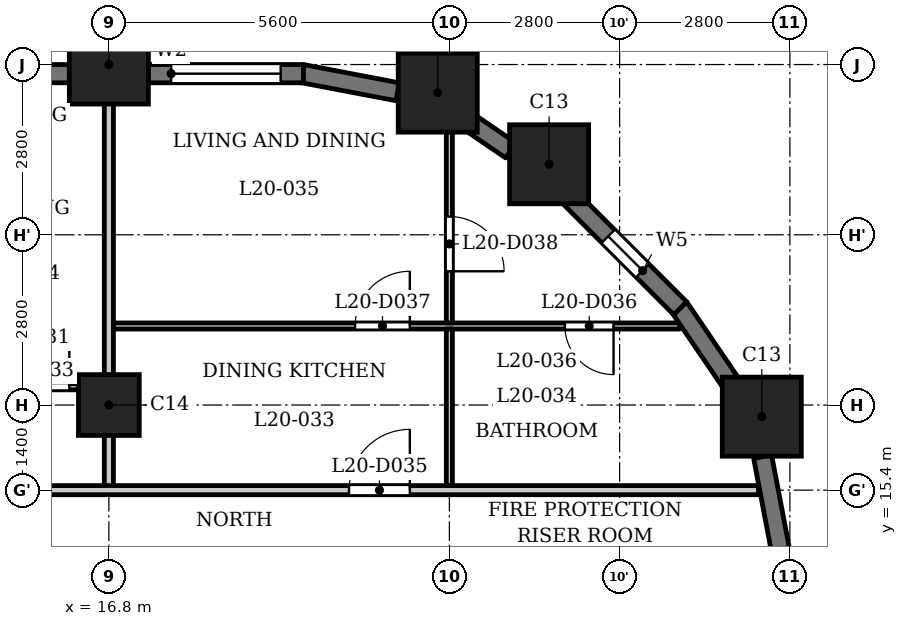
"""IFC4 building model, lengths in metres.
Left out: names, types, materials, properties, quantities, classifications, styles, units other than length and angle.
Written with IfcOpenShell. Run it as: python <this file> out.ifc"""

import sys

from ifc_helpers import new_model, si_unit, direction, frame, frame_2d, origin, origin_2d, place, context, subcontext, project, spatial, rectangle, extrude, element, fill, save


model = new_model("IFC4")
c1 = context("Model", 3, precision=1e-05, world=origin(), true_north=direction((0.0, 1.0)))
c2 = subcontext(c1, "Body", "Model", "MODEL_VIEW")
j1 = project(units=[si_unit("LENGTHUNIT", "METRE"), si_unit("PLANEANGLEUNIT", "RADIAN")], contexts=[c1])
p1 = place(None, origin())
s1 = spatial("IfcSite", under=j1, at=p1, CompositionType="ELEMENT")
p2 = place(p1, origin())
s2 = spatial("IfcBuilding", under=s1, at=p2, CompositionType="ELEMENT")
p3 = place(p2, frame((0.0, 0.0, 83.3)))
s3 = spatial("IfcBuildingStorey", under=s2, at=p3, CompositionType="ELEMENT", Elevation=83.3)
for number, where, z_axis, x_axis in (
    (1, (27.538, 16.609, 0.0), (0.0, 0.0, 1.0), (1.0, 0.0, 0.0)),
    (2, (24.04, 20.76, 0.0), (0.0, 0.0, 1.0), (1.0, 0.0, 0.0)),
    (3, (22.209, 21.938, 0.0), (0.0, 0.0, 1.0), (1.0, 0.0, 0.0)),
    (4, (16.8, 22.4, 0.0), (0.0, 0.0, 1.0), (1.0, 0.0, 0.0)),
):
    element("IfcColumn", number, at=place(p3, frame(where, z_axis=z_axis, x_axis=x_axis)), inside=s3, PredefinedType="COLUMN", context=c2, shape_type="SweptSolid", body=[
        extrude(rectangle(XDim=1.3, YDim=1.3, at=origin_2d()), origin(), (0.0, 0.0, 1.0), 3.5),
    ])
p4 = place(p3, frame((16.8, 16.8, 0.0), z_axis=(0.0, 0.0, 1.0), x_axis=(1.0, 0.0, 0.0)))
e5 = element("IfcColumn", 5, at=p4, inside=s3, PredefinedType="COLUMN", context=c2, shape_type="SweptSolid", body=[
    extrude(rectangle(XDim=1.0, YDim=1.0, at=origin_2d()), origin(), (0.0, 0.0, 1.0), 3.5),
])
for number, where, z_axis, x_axis in (
    (6, (27.853, 14.372, 0.0), (0.0, 0.0, 1.0), (-0.187, 0.982, 0.0)),
    (7, (27.082, 17.084, 0.0), (0.0, 0.0, 1.0), (-0.562, 0.827, 0.0)),
):
    element("IfcWall", number, at=place(p3, frame(where, z_axis=z_axis, x_axis=x_axis)), inside=s3, PredefinedType="SOLIDWALL", context=c2, shape_type="SweptSolid", body=[
        extrude(rectangle(XDim=1.606, YDim=0.3, at=frame_2d((0.803, 0.0))), origin(), (0.0, 0.0, 1.0), 2.4),
    ])
p5 = place(p3, frame((26.197, 18.391, 0.0), z_axis=(0.0, 0.0, 1.0), x_axis=(-0.707058908279, 0.707154650853, 0.0)))
e8 = element("IfcWall", 8, at=p5, inside=s3, PredefinedType="SOLIDWALL", context=c2, shape_type="SweptSolid", body=[
    extrude(rectangle(XDim=2.55, YDim=0.3, at=frame_2d((1.275, 0.0))), origin(), (0.0, 0.0, 1.0), 2.4),
])
p6 = place(p5, frame((0.875, 0.0, 0.6)))
e9 = element("IfcOpeningElement", 9, at=p6, cuts=e8, PredefinedType="OPENING", context=c2, shape_type="SweptSolid", body=[
    extrude(rectangle(XDim=0.8, YDim=1.55, at=frame_2d((0.4, 0.775))), frame((0.0, 0.16, 0.0), z_axis=(0.0, -1.0, 0.0), x_axis=(1.0, 0.0, 0.0)), (0.0, 0.0, 1.0), 0.32),
])
p7 = place(p3, frame((23.41, 20.989, 0.0), z_axis=(0.0, 0.0, 1.0), x_axis=(-0.827050703543, 0.562127328787, 0.0)))
e10 = element("IfcWall", 10, at=p7, inside=s3, PredefinedType="SOLIDWALL", context=c2, shape_type="SweptSolid", body=[
    extrude(rectangle(XDim=0.877, YDim=0.3, at=frame_2d((0.438, 0.0))), origin(), (0.0, 0.0, 1.0), 3.2),
])
p8 = place(p3, frame((21.55, 21.952, 0.0), z_axis=(0.0, 0.0, 1.0), x_axis=(-0.982278644094, 0.187426426519, 0.0)))
e11 = element("IfcWall", 11, at=p8, inside=s3, PredefinedType="SOLIDWALL", context=c2, shape_type="SweptSolid", body=[
    extrude(rectangle(XDim=1.606, YDim=0.3, at=frame_2d((0.803, 0.0))), origin(), (0.0, 0.0, 1.0), 2.4),
])
p9 = place(p3, frame((20.0, 22.25, 0.0), z_axis=(0.0, 0.0, 1.0), x_axis=(-1.0, 0.0, 0.0)))
e12 = element("IfcWall", 12, at=p9, inside=s3, PredefinedType="SOLIDWALL", context=c2, shape_type="SweptSolid", body=[
    extrude(rectangle(XDim=2.55, YDim=0.3, at=frame_2d((1.275, 0.0))), origin(), (0.0, 0.0, 1.0), 2.4),
])
p10 = place(p9, frame((0.375, 0.0, 0.9)))
e13 = element("IfcOpeningElement", 13, at=p10, cuts=e12, PredefinedType="OPENING", context=c2, shape_type="SweptSolid", body=[
    extrude(rectangle(XDim=1.8, YDim=1.25, at=frame_2d((0.9, 0.625))), frame((0.0, 0.16, 0.0), z_axis=(0.0, -1.0, 0.0), x_axis=(1.0, 0.0, 0.0)), (0.0, 0.0, 1.0), 0.32),
])
p11 = place(p3, frame((16.15, 22.25, 0.0), z_axis=(0.0, 0.0, 1.0), x_axis=(-1.0, 0.0, 0.0)))
e14 = element("IfcWall", 14, at=p11, inside=s3, PredefinedType="SOLIDWALL", context=c2, shape_type="SweptSolid", body=[
    extrude(rectangle(XDim=4.3, YDim=0.3, at=frame_2d((2.15, 0.0))), origin(), (0.0, 0.0, 1.0), 2.4),
])
p12 = place(p11, frame((0.337, 0.0, 0.6)))
e15 = element("IfcOpeningElement", 15, at=p12, cuts=e14, PredefinedType="OPENING", context=c2, shape_type="SweptSolid", body=[
    extrude(rectangle(XDim=1.2, YDim=1.55, at=frame_2d((0.6, 0.775))), frame((0.0, 0.16, 0.0), z_axis=(0.0, -1.0, 0.0), x_axis=(1.0, 0.0, 0.0)), (0.0, 0.0, 1.0), 0.32),
])
p13 = place(p11, frame((2.562, 0.0, 0.6)))
e16 = element("IfcOpeningElement", 16, at=p13, cuts=e14, PredefinedType="OPENING", context=c2, shape_type="SweptSolid", body=[
    extrude(rectangle(XDim=1.2, YDim=1.55, at=frame_2d((0.6, 0.775))), frame((0.0, 0.16, 0.0), z_axis=(0.0, -1.0, 0.0), x_axis=(1.0, 0.0, 0.0)), (0.0, 0.0, 1.0), 0.32),
])
p14 = place(p3, frame((14.925, 15.4, 0.0), z_axis=(0.0, 0.0, 1.0), x_axis=(1.0, 0.0, 0.0)))
e17 = element("IfcWall", 17, at=p14, inside=s3, PredefinedType="PARTITIONING", context=c2, shape_type="SweptSolid", body=[
    extrude(rectangle(XDim=12.559, YDim=0.15, at=frame_2d((6.279, 0.0))), origin(), (0.0, 0.0, 1.0), 3.2),
])
p15 = place(p14, frame((5.825, 0.0, 0.0)))
e18 = element("IfcOpeningElement", 18, at=p15, cuts=e17, PredefinedType="OPENING", context=c2, shape_type="SweptSolid", body=[
    extrude(rectangle(XDim=1.0, YDim=2.1, at=frame_2d((0.5, 1.05))), frame((0.0, 0.085, 0.0), z_axis=(0.0, -1.0, 0.0), x_axis=(1.0, 0.0, 0.0)), (0.0, 0.0, 1.0), 0.17),
])
p16 = place(p3, frame((-16.725, 17.1, 0.0), z_axis=(0.0, 0.0, 1.0), x_axis=(1.0, 0.0, 0.0)))
e19 = element("IfcWall", 19, at=p16, inside=s3, PredefinedType="PARTITIONING", context=c2, shape_type="SweptSolid", body=[
    extrude(rectangle(XDim=33.45, YDim=0.1, at=frame_2d((16.725, 0.0))), origin(), (0.0, 0.0, 1.0), 3.2),
])
p17 = place(p16, frame((3.925, 0.0, 0.0)))
e20 = element("IfcOpeningElement", 20, at=p17, cuts=e19, PredefinedType="OPENING", context=c2, shape_type="SweptSolid", body=[
    extrude(rectangle(XDim=0.8, YDim=2.1, at=frame_2d((0.4, 1.05))), frame((0.0, 0.06, 0.0), z_axis=(0.0, -1.0, 0.0), x_axis=(1.0, 0.0, 0.0)), (0.0, 0.0, 1.0), 0.12),
])
p18 = place(p16, frame((0.975, 0.0, 0.0)))
e21 = element("IfcOpeningElement", 21, at=p18, cuts=e19, PredefinedType="OPENING", context=c2, shape_type="SweptSolid", body=[
    extrude(rectangle(XDim=0.9, YDim=2.1, at=frame_2d((0.45, 1.05))), frame((0.0, 0.06, 0.0), z_axis=(0.0, -1.0, 0.0), x_axis=(1.0, 0.0, 0.0)), (0.0, 0.0, 1.0), 0.12),
])
p19 = place(p16, frame((6.425, 0.0, 0.0)))
e22 = element("IfcOpeningElement", 22, at=p19, cuts=e19, PredefinedType="OPENING", context=c2, shape_type="SweptSolid", body=[
    extrude(rectangle(XDim=0.8, YDim=2.1, at=frame_2d((0.4, 1.05))), frame((0.0, 0.06, 0.0), z_axis=(0.0, -1.0, 0.0), x_axis=(1.0, 0.0, 0.0)), (0.0, 0.0, 1.0), 0.12),
])
p20 = place(p16, frame((8.825, 0.0, 0.0)))
e23 = element("IfcOpeningElement", 23, at=p20, cuts=e19, PredefinedType="OPENING", context=c2, shape_type="SweptSolid", body=[
    extrude(rectangle(XDim=0.9, YDim=2.1, at=frame_2d((0.45, 1.05))), frame((0.0, 0.06, 0.0), z_axis=(0.0, -1.0, 0.0), x_axis=(1.0, 0.0, 0.0)), (0.0, 0.0, 1.0), 0.12),
])
p21 = place(p16, frame((12.375, 0.0, 0.0)))
e24 = element("IfcOpeningElement", 24, at=p21, cuts=e19, PredefinedType="OPENING", context=c2, shape_type="SweptSolid", body=[
    extrude(rectangle(XDim=0.9, YDim=2.1, at=frame_2d((0.45, 1.05))), frame((0.0, 0.06, 0.0), z_axis=(0.0, -1.0, 0.0), x_axis=(1.0, 0.0, 0.0)), (0.0, 0.0, 1.0), 0.12),
])
p22 = place(p16, frame((14.425, 0.0, 0.0)))
e25 = element("IfcOpeningElement", 25, at=p22, cuts=e19, PredefinedType="OPENING", context=c2, shape_type="SweptSolid", body=[
    extrude(rectangle(XDim=0.9, YDim=2.1, at=frame_2d((0.45, 1.05))), frame((0.0, 0.06, 0.0), z_axis=(0.0, -1.0, 0.0), x_axis=(1.0, 0.0, 0.0)), (0.0, 0.0, 1.0), 0.12),
])
p23 = place(p16, frame((26.225, 0.0, 0.0)))
e26 = element("IfcOpeningElement", 26, at=p23, cuts=e19, PredefinedType="OPENING", context=c2, shape_type="SweptSolid", body=[
    extrude(rectangle(XDim=0.8, YDim=2.1, at=frame_2d((0.4, 1.05))), frame((0.0, 0.06, 0.0), z_axis=(0.0, -1.0, 0.0), x_axis=(1.0, 0.0, 0.0)), (0.0, 0.0, 1.0), 0.12),
])
p24 = place(p16, frame((23.025, 0.0, 0.0)))
e27 = element("IfcOpeningElement", 27, at=p24, cuts=e19, PredefinedType="OPENING", context=c2, shape_type="SweptSolid", body=[
    extrude(rectangle(XDim=0.9, YDim=2.1, at=frame_2d((0.45, 1.05))), frame((0.0, 0.06, 0.0), z_axis=(0.0, -1.0, 0.0), x_axis=(1.0, 0.0, 0.0)), (0.0, 0.0, 1.0), 0.12),
])
p25 = place(p16, frame((17.775, 0.0, 0.0)))
e28 = element("IfcOpeningElement", 28, at=p25, cuts=e19, PredefinedType="OPENING", context=c2, shape_type="SweptSolid", body=[
    extrude(rectangle(XDim=0.9, YDim=2.1, at=frame_2d((0.45, 1.05))), frame((0.0, 0.06, 0.0), z_axis=(0.0, -1.0, 0.0), x_axis=(1.0, 0.0, 0.0)), (0.0, 0.0, 1.0), 0.12),
])
p26 = place(p16, frame((20.025, 0.0, 0.0)))
e29 = element("IfcOpeningElement", 29, at=p26, cuts=e19, PredefinedType="OPENING", context=c2, shape_type="SweptSolid", body=[
    extrude(rectangle(XDim=0.9, YDim=2.1, at=frame_2d((0.45, 1.05))), frame((0.0, 0.06, 0.0), z_axis=(0.0, -1.0, 0.0), x_axis=(1.0, 0.0, 0.0)), (0.0, 0.0, 1.0), 0.12),
])
p27 = place(p16, frame((28.825, 0.0, 0.0)))
e30 = element("IfcOpeningElement", 30, at=p27, cuts=e19, PredefinedType="OPENING", context=c2, shape_type="SweptSolid", body=[
    extrude(rectangle(XDim=0.8, YDim=2.1, at=frame_2d((0.4, 1.05))), frame((0.0, 0.06, 0.0), z_axis=(0.0, -1.0, 0.0), x_axis=(1.0, 0.0, 0.0)), (0.0, 0.0, 1.0), 0.12),
])
p28 = place(p16, frame((31.975, 0.0, 0.0)))
e31 = element("IfcOpeningElement", 31, at=p28, cuts=e19, PredefinedType="OPENING", context=c2, shape_type="SweptSolid", body=[
    extrude(rectangle(XDim=0.9, YDim=2.1, at=frame_2d((0.45, 1.05))), frame((0.0, 0.06, 0.0), z_axis=(0.0, -1.0, 0.0), x_axis=(1.0, 0.0, 0.0)), (0.0, 0.0, 1.0), 0.12),
])
p29 = place(p3, frame((16.875, 18.1, 0.0), z_axis=(0.0, 0.0, 1.0), x_axis=(1.0, 0.0, 0.0)))
e32 = element("IfcWall", 32, at=p29, inside=s3, PredefinedType="PARTITIONING", context=c2, shape_type="SweptSolid", body=[
    extrude(rectangle(XDim=9.315, YDim=0.1, at=frame_2d((4.658, 0.0))), origin(), (0.0, 0.0, 1.0), 3.2),
])
p30 = place(p29, frame((7.425, 0.0, 0.0)))
e33 = element("IfcOpeningElement", 33, at=p30, cuts=e32, PredefinedType="OPENING", context=c2, shape_type="SweptSolid", body=[
    extrude(rectangle(XDim=0.8, YDim=2.1, at=frame_2d((0.4, 1.05))), frame((0.0, 0.06, 0.0), z_axis=(0.0, -1.0, 0.0), x_axis=(1.0, 0.0, 0.0)), (0.0, 0.0, 1.0), 0.12),
])
p31 = place(p29, frame((3.975, 0.0, 0.0)))
e34 = element("IfcOpeningElement", 34, at=p31, cuts=e32, PredefinedType="OPENING", context=c2, shape_type="SweptSolid", body=[
    extrude(rectangle(XDim=0.9, YDim=2.1, at=frame_2d((0.45, 1.05))), frame((0.0, 0.06, 0.0), z_axis=(0.0, -1.0, 0.0), x_axis=(1.0, 0.0, 0.0)), (0.0, 0.0, 1.0), 0.12),
])
p32 = place(p3, frame((16.8, 15.475, 0.0), z_axis=(0.0, 0.0, 1.0), x_axis=(0.0, 1.0, 0.0)))
e35 = element("IfcWall", 35, at=p32, inside=s3, PredefinedType="PARTITIONING", context=c2, shape_type="SweptSolid", body=[
    extrude(rectangle(XDim=7.555, YDim=0.15, at=frame_2d((3.777, 0.0))), origin(), (0.0, 0.0, 1.0), 3.2),
])
p33 = place(p3, frame((22.4, 15.475, 0.0), z_axis=(0.0, 0.0, 1.0), x_axis=(0.0, 1.0, 0.0)))
e36 = element("IfcWall", 36, at=p33, inside=s3, PredefinedType="PARTITIONING", context=c2, shape_type="SweptSolid", body=[
    extrude(rectangle(XDim=2.575, YDim=0.1, at=frame_2d((1.288, 0.0))), origin(), (0.0, 0.0, 1.0), 3.2),
])
p34 = place(p3, frame((22.4, 18.15, 0.0), z_axis=(0.0, 0.0, 1.0), x_axis=(0.0, 1.0, 0.0)))
e37 = element("IfcWall", 37, at=p34, inside=s3, PredefinedType="PARTITIONING", context=c2, shape_type="SweptSolid", body=[
    extrude(rectangle(XDim=3.57, YDim=0.1, at=frame_2d((1.785, 0.0))), origin(), (0.0, 0.0, 1.0), 3.2),
])
p35 = place(p34, frame((0.85, 0.0, 0.0)))
e38 = element("IfcOpeningElement", 38, at=p35, cuts=e37, PredefinedType="OPENING", context=c2, shape_type="SweptSolid", body=[
    extrude(rectangle(XDim=0.9, YDim=2.1, at=frame_2d((0.45, 1.05))), frame((0.0, 0.06, 0.0), z_axis=(0.0, -1.0, 0.0), x_axis=(1.0, 0.0, 0.0)), (0.0, 0.0, 1.0), 0.12),
])
p36 = place(p28, origin())
e39 = element("IfcDoor", 39, at=p36, inside=s3, OperationType="SINGLE_SWING_LEFT", PredefinedType="DOOR", context=c2, shape_type="SweptSolid", body=[
    extrude(rectangle(XDim=0.9, YDim=2.1, at=frame_2d((0.45, 1.05))), frame((0.0, 0.025, 0.0), z_axis=(0.0, -1.0, 0.0), x_axis=(1.0, 0.0, 0.0)), (0.0, 0.0, 1.0), 0.05),
])
fill(e31, e39)
p37 = place(p15, origin())
e40 = element("IfcDoor", 40, at=p37, inside=s3, OperationType="SINGLE_SWING_LEFT", PredefinedType="DOOR", context=c2, shape_type="SweptSolid", body=[
    extrude(rectangle(XDim=1.0, YDim=2.1, at=frame_2d((0.5, 1.05))), frame((0.0, 0.025, 0.0), z_axis=(0.0, -1.0, 0.0), x_axis=(1.0, 0.0, 0.0)), (0.0, 0.0, 1.0), 0.05),
])
fill(e18, e40)
p38 = place(p30, origin())
e41 = element("IfcDoor", 41, at=p38, inside=s3, OperationType="SINGLE_SWING_RIGHT", PredefinedType="DOOR", context=c2, shape_type="SweptSolid", body=[
    extrude(rectangle(XDim=0.8, YDim=2.1, at=frame_2d((0.4, 1.05))), frame((0.0, 0.025, 0.0), z_axis=(0.0, -1.0, 0.0), x_axis=(1.0, 0.0, 0.0)), (0.0, 0.0, 1.0), 0.05),
])
fill(e33, e41)
p39 = place(p31, origin())
e42 = element("IfcDoor", 42, at=p39, inside=s3, OperationType="SINGLE_SWING_LEFT", PredefinedType="DOOR", context=c2, shape_type="SweptSolid", body=[
    extrude(rectangle(XDim=0.9, YDim=2.1, at=frame_2d((0.45, 1.05))), frame((0.0, 0.025, 0.0), z_axis=(0.0, -1.0, 0.0), x_axis=(1.0, 0.0, 0.0)), (0.0, 0.0, 1.0), 0.05),
])
fill(e34, e42)
p40 = place(p35, origin())
e43 = element("IfcDoor", 43, at=p40, inside=s3, OperationType="SINGLE_SWING_LEFT", PredefinedType="DOOR", context=c2, shape_type="SweptSolid", body=[
    extrude(rectangle(XDim=0.9, YDim=2.1, at=frame_2d((0.45, 1.05))), frame((0.0, 0.025, 0.0), z_axis=(0.0, -1.0, 0.0), x_axis=(1.0, 0.0, 0.0)), (0.0, 0.0, 1.0), 0.05),
])
fill(e38, e43)
p41 = place(p6, origin())
e44 = element("IfcWindow", 44, at=p41, inside=s3, PartitioningType="SINGLE_PANEL", PredefinedType="WINDOW", context=c2, shape_type="SweptSolid", body=[
    extrude(rectangle(XDim=0.8, YDim=1.55, at=frame_2d((0.4, 0.775))), frame((0.0, 0.03, 0.0), z_axis=(0.0, -1.0, 0.0), x_axis=(1.0, 0.0, 0.0)), (0.0, 0.0, 1.0), 0.06),
])
fill(e9, e44)
p42 = place(p10, origin())
e45 = element("IfcWindow", 45, at=p42, inside=s3, PartitioningType="SINGLE_PANEL", PredefinedType="WINDOW", context=c2, shape_type="SweptSolid", body=[
    extrude(rectangle(XDim=1.8, YDim=1.25, at=frame_2d((0.9, 0.625))), frame((0.0, 0.03, 0.0), z_axis=(0.0, -1.0, 0.0), x_axis=(1.0, 0.0, 0.0)), (0.0, 0.0, 1.0), 0.06),
])
fill(e13, e45)
save(model, sys.argv[1])
